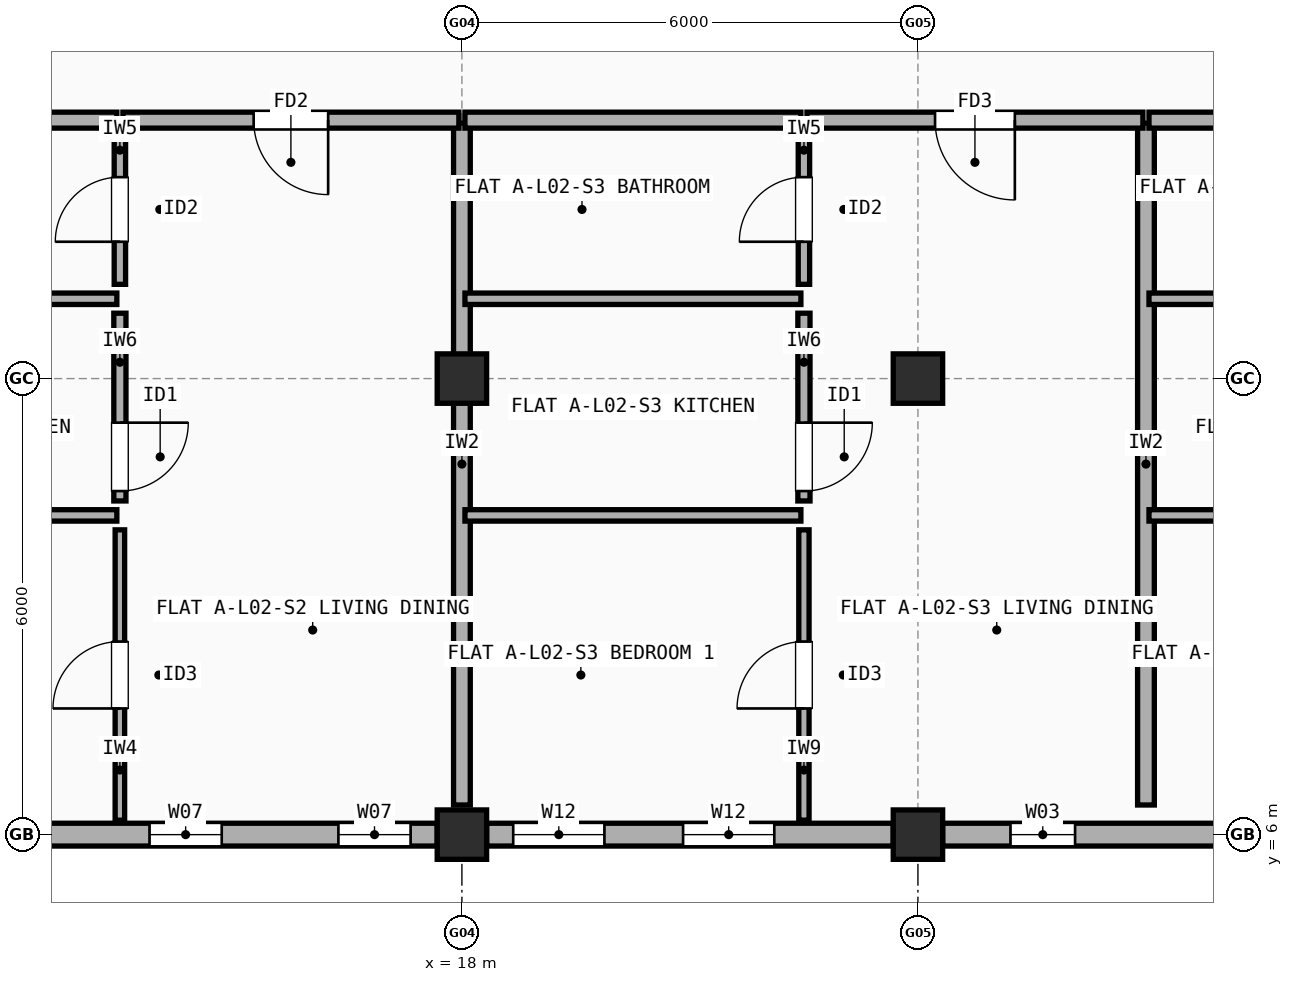
"""IFC4 building model, lengths in metres.
Left out: names, types, materials, properties, quantities, classifications, styles, units other than length and angle.
Written with IfcOpenShell. Run it as: python <this file> out.ifc"""

import sys

from ifc_helpers import new_model, si_unit, direction, frame, frame_2d, origin, origin_2d, place, context, subcontext, project, spatial, rectangle, extrude, element, fill, save


model = new_model("IFC4")
c1 = context("Model", 3, precision=1e-05, world=origin(), true_north=direction((0.0, 1.0)))
c2 = subcontext(c1, "Body", "Model", "MODEL_VIEW")
j1 = project(units=[si_unit("LENGTHUNIT", "METRE"), si_unit("PLANEANGLEUNIT", "RADIAN")], contexts=[c1])
p1 = place(None, origin())
s1 = spatial("IfcSite", under=j1, at=p1, CompositionType="ELEMENT")
p2 = place(p1, origin())
s2 = spatial("IfcBuilding", under=s1, at=p2, CompositionType="ELEMENT")
p3 = place(p2, frame((0.0, 0.0, 7.7)))
s3 = spatial("IfcBuildingStorey", under=s2, at=p3, CompositionType="ELEMENT", Elevation=7.7)
for number, where, z_axis, x_axis in (
    (1, (18.0, 6.0, 0.0), (0.0, 0.0, 1.0), (1.0, 0.0, 0.0)),
    (2, (18.0, 12.0, 0.0), (0.0, 0.0, 1.0), (1.0, 0.0, 0.0)),
    (3, (24.0, 6.0, 0.0), (0.0, 0.0, 1.0), (1.0, 0.0, 0.0)),
    (4, (24.0, 12.0, 0.0), (0.0, 0.0, 1.0), (1.0, 0.0, 0.0)),
):
    element("IfcColumn", number, at=place(p3, frame(where, z_axis=z_axis, x_axis=x_axis)), inside=s3, PredefinedType="COLUMN", context=c2, shape_type="SweptSolid", body=[
        extrude(rectangle(XDim=0.65, YDim=0.65, at=origin_2d()), origin(), (0.0, 0.0, 1.0), 2.955),
    ])
p4 = place(p3, frame((12.325, 6.0, 0.0), z_axis=(0.0, 0.0, 1.0), x_axis=(1.0, 0.0, 0.0)))
e5 = element("IfcWall", 5, at=p4, inside=s3, PredefinedType="STANDARD", context=c2, shape_type="SweptSolid", body=[
    extrude(rectangle(XDim=5.35, YDim=0.3, at=frame_2d((2.675, 0.0))), origin(), (0.0, 0.0, 1.0), 2.437),
])
p5 = place(p4, frame((1.565, 0.0, 0.9)))
e6 = element("IfcOpeningElement", 6, at=p5, cuts=e5, PredefinedType="OPENING", context=c2, shape_type="SweptSolid", body=[
    extrude(rectangle(XDim=0.95, YDim=1.35, at=frame_2d((0.475, 0.675))), frame((0.0, 0.16, 0.0), z_axis=(0.0, -1.0, 0.0), x_axis=(1.0, 0.0, 0.0)), (0.0, 0.0, 1.0), 0.32),
])
p6 = place(p4, frame((4.05, 0.0, 0.9)))
e7 = element("IfcOpeningElement", 7, at=p6, cuts=e5, PredefinedType="OPENING", context=c2, shape_type="SweptSolid", body=[
    extrude(rectangle(XDim=0.95, YDim=1.35, at=frame_2d((0.475, 0.675))), frame((0.0, 0.16, 0.0), z_axis=(0.0, -1.0, 0.0), x_axis=(1.0, 0.0, 0.0)), (0.0, 0.0, 1.0), 0.32),
])
p7 = place(p3, frame((18.325, 6.0, 0.0), z_axis=(0.0, 0.0, 1.0), x_axis=(1.0, 0.0, 0.0)))
e8 = element("IfcWall", 8, at=p7, inside=s3, PredefinedType="STANDARD", context=c2, shape_type="SweptSolid", body=[
    extrude(rectangle(XDim=5.35, YDim=0.3, at=frame_2d((2.675, 0.0))), origin(), (0.0, 0.0, 1.0), 2.437),
])
p8 = place(p7, frame((0.35, 0.0, 0.9)))
e9 = element("IfcOpeningElement", 9, at=p8, cuts=e8, PredefinedType="OPENING", context=c2, shape_type="SweptSolid", body=[
    extrude(rectangle(XDim=1.2, YDim=1.35, at=frame_2d((0.6, 0.675))), frame((0.0, 0.16, 0.0), z_axis=(0.0, -1.0, 0.0), x_axis=(1.0, 0.0, 0.0)), (0.0, 0.0, 1.0), 0.32),
])
p9 = place(p7, frame((2.585, 0.0, 0.9)))
e10 = element("IfcOpeningElement", 10, at=p9, cuts=e8, PredefinedType="OPENING", context=c2, shape_type="SweptSolid", body=[
    extrude(rectangle(XDim=1.2, YDim=1.35, at=frame_2d((0.6, 0.675))), frame((0.0, 0.16, 0.0), z_axis=(0.0, -1.0, 0.0), x_axis=(1.0, 0.0, 0.0)), (0.0, 0.0, 1.0), 0.32),
])
p10 = place(p3, frame((24.325, 6.0, 0.0), z_axis=(0.0, 0.0, 1.0), x_axis=(1.0, 0.0, 0.0)))
e11 = element("IfcWall", 11, at=p10, inside=s3, PredefinedType="STANDARD", context=c2, shape_type="SweptSolid", body=[
    extrude(rectangle(XDim=5.4, YDim=0.3, at=frame_2d((2.7, 0.0))), origin(), (0.0, 0.0, 1.0), 2.437),
])
p11 = place(p10, frame((0.893, 0.0, 0.9)))
e12 = element("IfcOpeningElement", 12, at=p11, cuts=e11, PredefinedType="OPENING", context=c2, shape_type="SweptSolid", body=[
    extrude(rectangle(XDim=0.85, YDim=1.25, at=frame_2d((0.425, 0.625))), frame((0.0, 0.16, 0.0), z_axis=(0.0, -1.0, 0.0), x_axis=(1.0, 0.0, 0.0)), (0.0, 0.0, 1.0), 0.32),
])
p12 = place(p10, frame((3.607, 0.0, 0.9)))
e13 = element("IfcOpeningElement", 13, at=p12, cuts=e11, PredefinedType="OPENING", context=c2, shape_type="SweptSolid", body=[
    extrude(rectangle(XDim=0.9, YDim=1.3, at=frame_2d((0.45, 0.65))), frame((0.0, 0.16, 0.0), z_axis=(0.0, -1.0, 0.0), x_axis=(1.0, 0.0, 0.0)), (0.0, 0.0, 1.0), 0.32),
])
p13 = place(p3, frame((18.0, 6.39, 0.0), z_axis=(0.0, 0.0, 1.0), x_axis=(0.0, 1.0, 0.0)))
e14 = element("IfcWall", 14, at=p13, inside=s3, PredefinedType="SOLIDWALL", context=c2, shape_type="SweptSolid", body=[
    extrude(rectangle(XDim=8.97, YDim=0.22, at=frame_2d((4.485, 0.0))), origin(), (0.0, 0.0, 1.0), 2.337),
])
p14 = place(p3, frame((9.04, 15.4, 0.0), z_axis=(0.0, 0.0, 1.0), x_axis=(1.0, 0.0, 0.0)))
e15 = element("IfcWall", 15, at=p14, inside=s3, PredefinedType="SOLIDWALL", context=c2, shape_type="SweptSolid", body=[
    extrude(rectangle(XDim=4.42, YDim=0.21, at=frame_2d((2.21, 0.0))), origin(), (0.0, 0.0, 1.0), 2.337),
])
p15 = place(p3, frame((13.54, 15.4, 0.0), z_axis=(0.0, 0.0, 1.0), x_axis=(1.0, 0.0, 0.0)))
e16 = element("IfcWall", 16, at=p15, inside=s3, PredefinedType="SOLIDWALL", context=c2, shape_type="SweptSolid", body=[
    extrude(rectangle(XDim=4.42, YDim=0.21, at=frame_2d((2.21, 0.0))), origin(), (0.0, 0.0, 1.0), 2.337),
])
p16 = place(p15, frame((1.72, 0.0, 0.0)))
e17 = element("IfcOpeningElement", 17, at=p16, cuts=e16, PredefinedType="OPENING", context=c2, shape_type="SweptSolid", body=[
    extrude(rectangle(XDim=0.98, YDim=2.15, at=frame_2d((0.49, 1.075))), frame((0.0, 0.115, 0.0), z_axis=(0.0, -1.0, 0.0), x_axis=(1.0, 0.0, 0.0)), (0.0, 0.0, 1.0), 0.23),
])
p17 = place(p3, frame((13.5, 6.19, 0.0), z_axis=(0.0, 0.0, 1.0), x_axis=(0.0, 1.0, 0.0)))
e18 = element("IfcWall", 18, at=p17, inside=s3, PredefinedType="PARTITIONING", context=c2, shape_type="SweptSolid", body=[
    extrude(rectangle(XDim=3.82, YDim=0.125, at=frame_2d((1.91, 0.0))), origin(), (0.0, 0.0, 1.0), 2.955),
])
p18 = place(p17, frame((1.47, 0.0, 0.0)))
e19 = element("IfcOpeningElement", 19, at=p18, cuts=e18, PredefinedType="OPENING", context=c2, shape_type="SweptSolid", body=[
    extrude(rectangle(XDim=0.88, YDim=2.1, at=frame_2d((0.44, 1.05))), frame((0.0, 0.073, 0.0), z_axis=(0.0, -1.0, 0.0), x_axis=(1.0, 0.0, 0.0)), (0.0, 0.0, 1.0), 0.145),
])
p19 = place(p3, frame((13.5, 10.39, 0.0), z_axis=(0.0, 0.0, 1.0), x_axis=(0.0, 1.0, 0.0)))
e20 = element("IfcWall", 20, at=p19, inside=s3, PredefinedType="PLUMBINGWALL", context=c2, shape_type="SweptSolid", body=[
    extrude(rectangle(XDim=2.47, YDim=0.16, at=frame_2d((1.235, 0.0))), origin(), (0.0, 0.0, 1.0), 2.387),
])
p20 = place(p19, frame((0.13, 0.0, 0.0)))
e21 = element("IfcOpeningElement", 21, at=p20, cuts=e20, PredefinedType="OPENING", context=c2, shape_type="SweptSolid", body=[
    extrude(rectangle(XDim=0.9, YDim=2.1, at=frame_2d((0.45, 1.05))), frame((0.0, 0.09, 0.0), z_axis=(0.0, -1.0, 0.0), x_axis=(1.0, 0.0, 0.0)), (0.0, 0.0, 1.0), 0.18),
])
p21 = place(p3, frame((13.5, 13.24, 0.0), z_axis=(0.0, 0.0, 1.0), x_axis=(0.0, 1.0, 0.0)))
e22 = element("IfcWall", 22, at=p21, inside=s3, PredefinedType="PARTITIONING", context=c2, shape_type="SweptSolid", body=[
    extrude(rectangle(XDim=1.97, YDim=0.15, at=frame_2d((0.985, 0.0))), origin(), (0.0, 0.0, 1.0), 2.955),
])
p22 = place(p21, frame((0.56, 0.0, 0.0)))
e23 = element("IfcOpeningElement", 23, at=p22, cuts=e22, PredefinedType="OPENING", context=c2, shape_type="SweptSolid", body=[
    extrude(rectangle(XDim=0.85, YDim=2.1, at=frame_2d((0.425, 1.05))), frame((0.0, 0.085, 0.0), z_axis=(0.0, -1.0, 0.0), x_axis=(1.0, 0.0, 0.0)), (0.0, 0.0, 1.0), 0.17),
])
for number, where, z_axis, x_axis in (
    (24, (9.04, 10.2, 0.0), (0.0, 0.0, 1.0), (1.0, 0.0, 0.0)),
    (25, (9.04, 13.05, 0.0), (0.0, 0.0, 1.0), (1.0, 0.0, 0.0)),
):
    element("IfcWall", number, at=place(p3, frame(where, z_axis=z_axis, x_axis=x_axis)), inside=s3, PredefinedType="PARTITIONING", context=c2, shape_type="SweptSolid", body=[
        extrude(rectangle(XDim=4.42, YDim=0.15, at=frame_2d((2.21, 0.0))), origin(), (0.0, 0.0, 1.0), 2.337),
    ])
p23 = place(p3, frame((27.0, 6.39, 0.0), z_axis=(0.0, 0.0, 1.0), x_axis=(0.0, 1.0, 0.0)))
e26 = element("IfcWall", 26, at=p23, inside=s3, PredefinedType="SOLIDWALL", context=c2, shape_type="SweptSolid", body=[
    extrude(rectangle(XDim=8.97, YDim=0.22, at=frame_2d((4.485, 0.0))), origin(), (0.0, 0.0, 1.0), 2.387),
])
p24 = place(p3, frame((18.04, 15.4, 0.0), z_axis=(0.0, 0.0, 1.0), x_axis=(1.0, 0.0, 0.0)))
e27 = element("IfcWall", 27, at=p24, inside=s3, PredefinedType="SOLIDWALL", context=c2, shape_type="SweptSolid", body=[
    extrude(rectangle(XDim=4.42, YDim=0.21, at=frame_2d((2.21, 0.0))), origin(), (0.0, 0.0, 1.0), 2.337),
])
p25 = place(p3, frame((22.54, 15.4, 0.0), z_axis=(0.0, 0.0, 1.0), x_axis=(1.0, 0.0, 0.0)))
e28 = element("IfcWall", 28, at=p25, inside=s3, PredefinedType="SOLIDWALL", context=c2, shape_type="SweptSolid", body=[
    extrude(rectangle(XDim=4.42, YDim=0.21, at=frame_2d((2.21, 0.0))), origin(), (0.0, 0.0, 1.0), 2.337),
])
p26 = place(p25, frame((1.685, 0.0, 0.0)))
e29 = element("IfcOpeningElement", 29, at=p26, cuts=e28, PredefinedType="OPENING", context=c2, shape_type="SweptSolid", body=[
    extrude(rectangle(XDim=1.05, YDim=2.15, at=frame_2d((0.525, 1.075))), frame((0.0, 0.115, 0.0), z_axis=(0.0, -1.0, 0.0), x_axis=(1.0, 0.0, 0.0)), (0.0, 0.0, 1.0), 0.23),
])
p27 = place(p3, frame((22.5, 6.19, 0.0), z_axis=(0.0, 0.0, 1.0), x_axis=(0.0, 1.0, 0.0)))
e30 = element("IfcWall", 30, at=p27, inside=s3, PredefinedType="PARTITIONING", context=c2, shape_type="SweptSolid", body=[
    extrude(rectangle(XDim=3.82, YDim=0.135, at=frame_2d((1.91, 0.0))), origin(), (0.0, 0.0, 1.0), 2.955),
])
p28 = place(p27, frame((1.47, 0.0, 0.0)))
e31 = element("IfcOpeningElement", 31, at=p28, cuts=e30, PredefinedType="OPENING", context=c2, shape_type="SweptSolid", body=[
    extrude(rectangle(XDim=0.88, YDim=2.1, at=frame_2d((0.44, 1.05))), frame((0.0, 0.077, 0.0), z_axis=(0.0, -1.0, 0.0), x_axis=(1.0, 0.0, 0.0)), (0.0, 0.0, 1.0), 0.155),
])
p29 = place(p3, frame((22.5, 10.39, 0.0), z_axis=(0.0, 0.0, 1.0), x_axis=(0.0, 1.0, 0.0)))
e32 = element("IfcWall", 32, at=p29, inside=s3, PredefinedType="PLUMBINGWALL", context=c2, shape_type="SweptSolid", body=[
    extrude(rectangle(XDim=2.47, YDim=0.16, at=frame_2d((1.235, 0.0))), origin(), (0.0, 0.0, 1.0), 2.387),
])
p30 = place(p29, frame((0.13, 0.0, 0.0)))
e33 = element("IfcOpeningElement", 33, at=p30, cuts=e32, PredefinedType="OPENING", context=c2, shape_type="SweptSolid", body=[
    extrude(rectangle(XDim=0.9, YDim=2.1, at=frame_2d((0.45, 1.05))), frame((0.0, 0.09, 0.0), z_axis=(0.0, -1.0, 0.0), x_axis=(1.0, 0.0, 0.0)), (0.0, 0.0, 1.0), 0.18),
])
p31 = place(p3, frame((22.5, 13.24, 0.0), z_axis=(0.0, 0.0, 1.0), x_axis=(0.0, 1.0, 0.0)))
e34 = element("IfcWall", 34, at=p31, inside=s3, PredefinedType="PARTITIONING", context=c2, shape_type="SweptSolid", body=[
    extrude(rectangle(XDim=1.97, YDim=0.15, at=frame_2d((0.985, 0.0))), origin(), (0.0, 0.0, 1.0), 2.955),
])
p32 = place(p31, frame((0.56, 0.0, 0.0)))
e35 = element("IfcOpeningElement", 35, at=p32, cuts=e34, PredefinedType="OPENING", context=c2, shape_type="SweptSolid", body=[
    extrude(rectangle(XDim=0.85, YDim=2.1, at=frame_2d((0.425, 1.05))), frame((0.0, 0.085, 0.0), z_axis=(0.0, -1.0, 0.0), x_axis=(1.0, 0.0, 0.0)), (0.0, 0.0, 1.0), 0.17),
])
for number, where, z_axis, x_axis in (
    (36, (18.04, 10.2, 0.0), (0.0, 0.0, 1.0), (1.0, 0.0, 0.0)),
    (37, (18.04, 13.05, 0.0), (0.0, 0.0, 1.0), (1.0, 0.0, 0.0)),
):
    element("IfcWall", number, at=place(p3, frame(where, z_axis=z_axis, x_axis=x_axis)), inside=s3, PredefinedType="PARTITIONING", context=c2, shape_type="SweptSolid", body=[
        extrude(rectangle(XDim=4.42, YDim=0.15, at=frame_2d((2.21, 0.0))), origin(), (0.0, 0.0, 1.0), 2.337),
    ])
p33 = place(p3, frame((27.04, 15.4, 0.0), z_axis=(0.0, 0.0, 1.0), x_axis=(1.0, 0.0, 0.0)))
e38 = element("IfcWall", 38, at=p33, inside=s3, PredefinedType="SOLIDWALL", context=c2, shape_type="SweptSolid", body=[
    extrude(rectangle(XDim=4.42, YDim=0.21, at=frame_2d((2.21, 0.0))), origin(), (0.0, 0.0, 1.0), 2.437),
])
for number, where, z_axis, x_axis in (
    (39, (27.04, 10.2, 0.0), (0.0, 0.0, 1.0), (1.0, 0.0, 0.0)),
    (40, (27.04, 13.05, 0.0), (0.0, 0.0, 1.0), (1.0, 0.0, 0.0)),
):
    element("IfcWall", number, at=place(p3, frame(where, z_axis=z_axis, x_axis=x_axis)), inside=s3, PredefinedType="PARTITIONING", context=c2, shape_type="SweptSolid", body=[
        extrude(rectangle(XDim=4.42, YDim=0.15, at=frame_2d((2.21, 0.0))), origin(), (0.0, 0.0, 1.0), 2.437),
    ])
p34 = place(p5, origin())
e41 = element("IfcWindow", 41, at=p34, inside=s3, PartitioningType="SINGLE_PANEL", PredefinedType="WINDOW", context=c2, shape_type="SweptSolid", body=[
    extrude(rectangle(XDim=0.95, YDim=1.35, at=frame_2d((0.475, 0.675))), frame((0.0, 0.03, 0.0), z_axis=(0.0, -1.0, 0.0), x_axis=(1.0, 0.0, 0.0)), (0.0, 0.0, 1.0), 0.06),
])
fill(e6, e41)
p35 = place(p6, origin())
e42 = element("IfcWindow", 42, at=p35, inside=s3, PartitioningType="SINGLE_PANEL", PredefinedType="WINDOW", context=c2, shape_type="SweptSolid", body=[
    extrude(rectangle(XDim=0.95, YDim=1.35, at=frame_2d((0.475, 0.675))), frame((0.0, 0.03, 0.0), z_axis=(0.0, -1.0, 0.0), x_axis=(1.0, 0.0, 0.0)), (0.0, 0.0, 1.0), 0.06),
])
fill(e7, e42)
p36 = place(p8, origin())
e43 = element("IfcWindow", 43, at=p36, inside=s3, PartitioningType="SINGLE_PANEL", PredefinedType="WINDOW", context=c2, shape_type="SweptSolid", body=[
    extrude(rectangle(XDim=1.2, YDim=1.35, at=frame_2d((0.6, 0.675))), frame((0.0, 0.03, 0.0), z_axis=(0.0, -1.0, 0.0), x_axis=(1.0, 0.0, 0.0)), (0.0, 0.0, 1.0), 0.06),
])
fill(e9, e43)
p37 = place(p9, origin())
e44 = element("IfcWindow", 44, at=p37, inside=s3, PartitioningType="SINGLE_PANEL", PredefinedType="WINDOW", context=c2, shape_type="SweptSolid", body=[
    extrude(rectangle(XDim=1.2, YDim=1.35, at=frame_2d((0.6, 0.675))), frame((0.0, 0.03, 0.0), z_axis=(0.0, -1.0, 0.0), x_axis=(1.0, 0.0, 0.0)), (0.0, 0.0, 1.0), 0.06),
])
fill(e10, e44)
p38 = place(p11, origin())
e45 = element("IfcWindow", 45, at=p38, inside=s3, PartitioningType="SINGLE_PANEL", PredefinedType="WINDOW", context=c2, shape_type="SweptSolid", body=[
    extrude(rectangle(XDim=0.85, YDim=1.25, at=frame_2d((0.425, 0.625))), frame((0.0, 0.03, 0.0), z_axis=(0.0, -1.0, 0.0), x_axis=(1.0, 0.0, 0.0)), (0.0, 0.0, 1.0), 0.06),
])
fill(e12, e45)
p39 = place(p16, origin())
e46 = element("IfcDoor", 46, at=p39, inside=s3, OperationType="SINGLE_SWING_RIGHT", PredefinedType="DOOR", context=c2, shape_type="SweptSolid", body=[
    extrude(rectangle(XDim=0.98, YDim=2.15, at=frame_2d((0.49, 1.075))), frame((0.0, 0.025, 0.0), z_axis=(0.0, -1.0, 0.0), x_axis=(1.0, 0.0, 0.0)), (0.0, 0.0, 1.0), 0.05),
])
fill(e17, e46)
p40 = place(p18, origin())
e47 = element("IfcDoor", 47, at=p40, inside=s3, OperationType="SINGLE_SWING_LEFT", PredefinedType="DOOR", context=c2, shape_type="SweptSolid", body=[
    extrude(rectangle(XDim=0.88, YDim=2.1, at=frame_2d((0.44, 1.05))), frame((0.0, 0.025, 0.0), z_axis=(0.0, -1.0, 0.0), x_axis=(1.0, 0.0, 0.0)), (0.0, 0.0, 1.0), 0.05),
])
fill(e19, e47)
p41 = place(p20, origin())
e48 = element("IfcDoor", 48, at=p41, inside=s3, OperationType="SINGLE_SWING_RIGHT", PredefinedType="DOOR", context=c2, shape_type="SweptSolid", body=[
    extrude(rectangle(XDim=0.9, YDim=2.1, at=frame_2d((0.45, 1.05))), frame((0.0, 0.025, 0.0), z_axis=(0.0, -1.0, 0.0), x_axis=(1.0, 0.0, 0.0)), (0.0, 0.0, 1.0), 0.05),
])
fill(e21, e48)
p42 = place(p22, origin())
e49 = element("IfcDoor", 49, at=p42, inside=s3, OperationType="SINGLE_SWING_LEFT", PredefinedType="DOOR", context=c2, shape_type="SweptSolid", body=[
    extrude(rectangle(XDim=0.85, YDim=2.1, at=frame_2d((0.425, 1.05))), frame((0.0, 0.025, 0.0), z_axis=(0.0, -1.0, 0.0), x_axis=(1.0, 0.0, 0.0)), (0.0, 0.0, 1.0), 0.05),
])
fill(e23, e49)
p43 = place(p26, origin())
e50 = element("IfcDoor", 50, at=p43, inside=s3, OperationType="SINGLE_SWING_RIGHT", PredefinedType="DOOR", context=c2, shape_type="SweptSolid", body=[
    extrude(rectangle(XDim=1.05, YDim=2.15, at=frame_2d((0.525, 1.075))), frame((0.0, 0.025, 0.0), z_axis=(0.0, -1.0, 0.0), x_axis=(1.0, 0.0, 0.0)), (0.0, 0.0, 1.0), 0.05),
])
fill(e29, e50)
p44 = place(p28, origin())
e51 = element("IfcDoor", 51, at=p44, inside=s3, OperationType="SINGLE_SWING_LEFT", PredefinedType="DOOR", context=c2, shape_type="SweptSolid", body=[
    extrude(rectangle(XDim=0.88, YDim=2.1, at=frame_2d((0.44, 1.05))), frame((0.0, 0.025, 0.0), z_axis=(0.0, -1.0, 0.0), x_axis=(1.0, 0.0, 0.0)), (0.0, 0.0, 1.0), 0.05),
])
fill(e31, e51)
p45 = place(p30, origin())
e52 = element("IfcDoor", 52, at=p45, inside=s3, OperationType="SINGLE_SWING_RIGHT", PredefinedType="DOOR", context=c2, shape_type="SweptSolid", body=[
    extrude(rectangle(XDim=0.9, YDim=2.1, at=frame_2d((0.45, 1.05))), frame((0.0, 0.025, 0.0), z_axis=(0.0, -1.0, 0.0), x_axis=(1.0, 0.0, 0.0)), (0.0, 0.0, 1.0), 0.05),
])
fill(e33, e52)
p46 = place(p32, origin())
e53 = element("IfcDoor", 53, at=p46, inside=s3, OperationType="SINGLE_SWING_LEFT", PredefinedType="DOOR", context=c2, shape_type="SweptSolid", body=[
    extrude(rectangle(XDim=0.85, YDim=2.1, at=frame_2d((0.425, 1.05))), frame((0.0, 0.025, 0.0), z_axis=(0.0, -1.0, 0.0), x_axis=(1.0, 0.0, 0.0)), (0.0, 0.0, 1.0), 0.05),
])
fill(e35, e53)
save(model, sys.argv[1])
